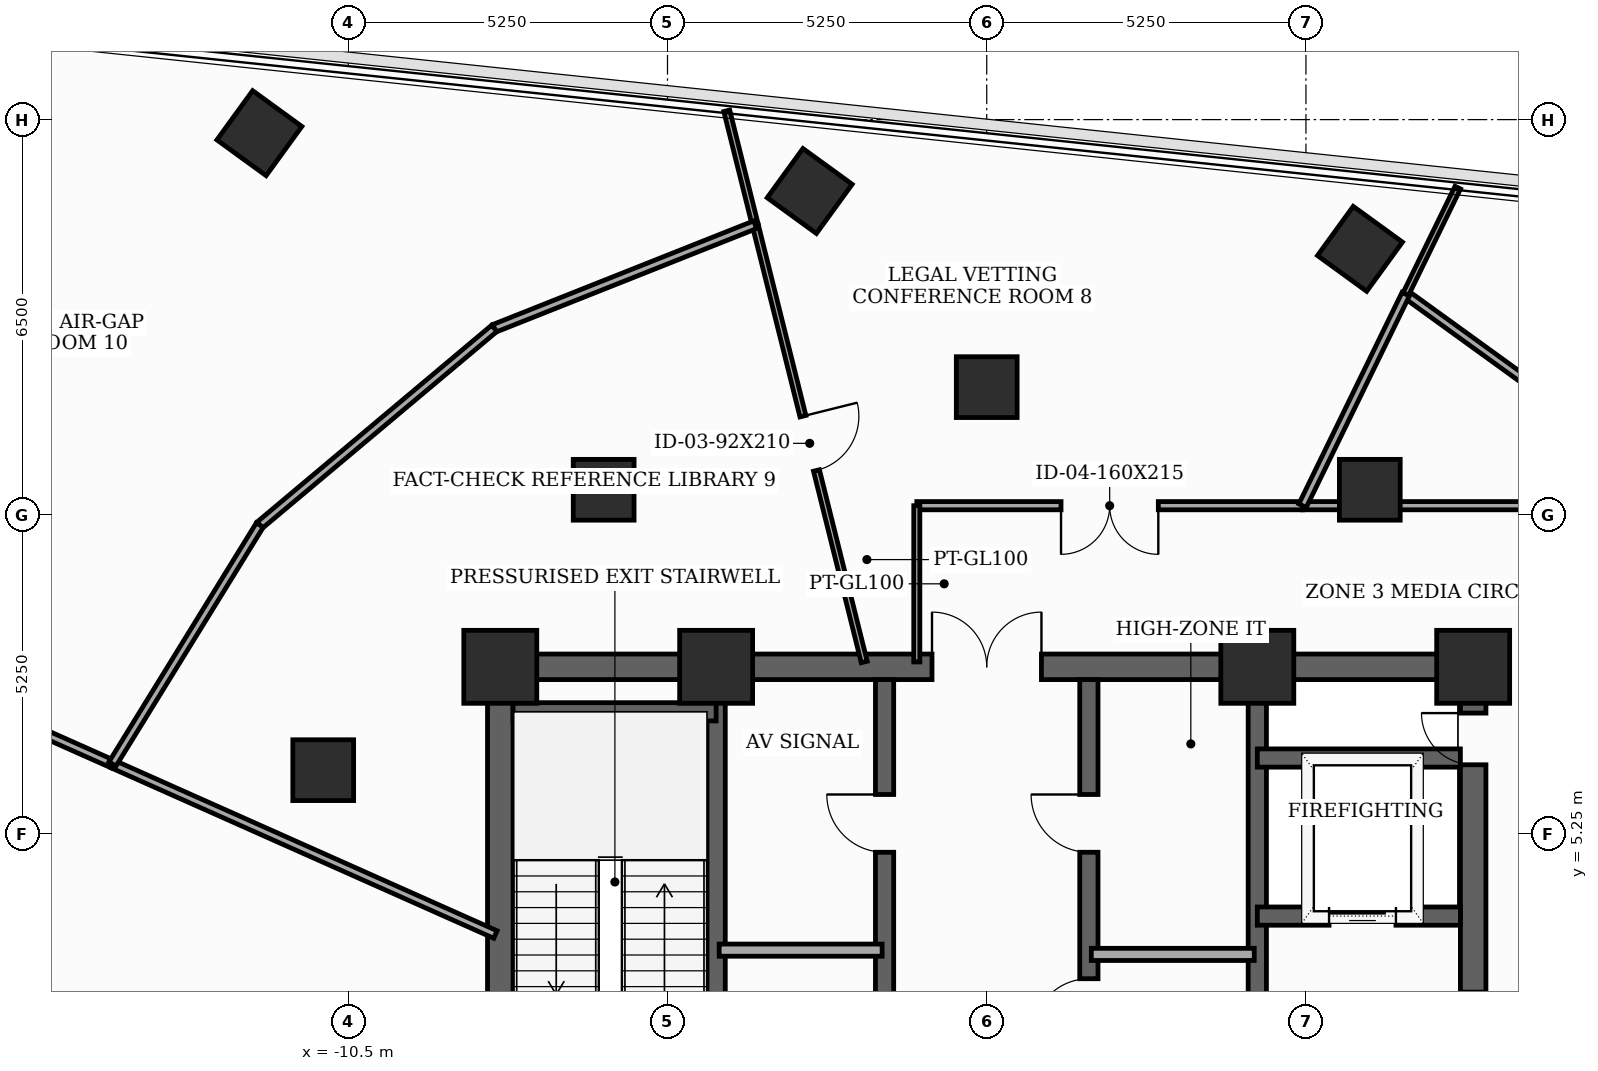
"""IFC4 building model, lengths in metres.
Left out: names, types, materials, properties, quantities, classifications, styles, units other than length and angle.
Written with IfcOpenShell. Run it as: python <this file> out.ifc"""

import sys

from ifc_helpers import new_model, si_unit, direction, frame, frame_2d, origin, origin_2d, place, context, subcontext, project, spatial, rectangle, extrude, element, fill, save


model = new_model("IFC4")
c1 = context("Model", 3, precision=1e-05, world=origin(), true_north=direction((0.0, 1.0)))
c2 = subcontext(c1, "Body", "Model", "MODEL_VIEW")
j1 = project(units=[si_unit("LENGTHUNIT", "METRE"), si_unit("PLANEANGLEUNIT", "RADIAN")], contexts=[c1])
p1 = place(None, origin())
s1 = spatial("IfcSite", under=j1, at=p1, CompositionType="ELEMENT")
p2 = place(p1, origin())
s2 = spatial("IfcBuilding", under=s1, at=p2, CompositionType="ELEMENT")
p3 = place(p2, frame((0.0, 0.0, 233.7)))
s3 = spatial("IfcBuildingStorey", under=s2, at=p3, CompositionType="ELEMENT", Elevation=233.7)
for number, where, z_axis, x_axis in (
    (1, (8.0, 8.0, 0.0), (0.0, 0.0, 1.0), (1.0, 0.0, 0.0)),
    (2, (4.45, 8.0, 0.0), (0.0, 0.0, 1.0), (1.0, 0.0, 0.0)),
    (3, (-4.45, 8.0, 0.0), (0.0, 0.0, 1.0), (1.0, 0.0, 0.0)),
    (4, (-8.0, 8.0, 0.0), (0.0, 0.0, 1.0), (1.0, 0.0, 0.0)),
):
    element("IfcColumn", number, at=place(p3, frame(where, z_axis=z_axis, x_axis=x_axis)), inside=s3, PredefinedType="COLUMN", context=c2, shape_type="SweptSolid", body=[
        extrude(rectangle(XDim=1.2, YDim=1.2, at=origin_2d()), origin(), (0.0, 0.0, 1.0), 3.7),
    ])
for number, where, z_axis, x_axis in (
    (5, (6.3, 10.912, 0.0), (0.0, 0.0, 1.0), (1.0, 0.0, 0.0)),
    (6, (0.0, 12.6, 0.0), (0.0, 0.0, 1.0), (1.0, 0.0, 0.0)),
    (7, (-6.3, 10.912, 0.0), (0.0, 0.0, 1.0), (1.0, 0.0, 0.0)),
    (8, (-10.912, 6.3, 0.0), (0.0, 0.0, 1.0), (1.0, 0.0, 0.0)),
    (9, (6.138, 14.875, 0.0), (0.0, 0.0, 1.0), (0.588, 0.809, 0.0)),
    (10, (-2.912, 15.826, 0.0), (0.0, 0.0, 1.0), (0.588, 0.809, 0.0)),
    (11, (-11.962, 16.777, 0.0), (0.0, 0.0, 1.0), (0.588, 0.809, 0.0)),
):
    element("IfcColumn", number, at=place(p3, frame(where, z_axis=z_axis, x_axis=x_axis)), inside=s3, PredefinedType="COLUMN", context=c2, shape_type="SweptSolid", body=[
        extrude(rectangle(XDim=1.0, YDim=1.0, at=origin_2d()), origin(), (0.0, 0.0, 1.0), 3.7),
    ])
p4 = place(p3, frame((-8.0, -8.0, 0.0), z_axis=(0.0, 0.0, 1.0), x_axis=(0.0, 1.0, 0.0)))
e12 = element("IfcWall", 12, at=p4, inside=s3, PredefinedType="SHEAR", context=c2, shape_type="SweptSolid", body=[
    extrude(rectangle(XDim=16.0, YDim=0.42, at=frame_2d((8.0, 0.0))), origin(), (0.0, 0.0, 1.0), 3.5),
])
p5 = place(p4, frame((0.761, 0.0, 0.0)))
e13 = element("IfcOpeningElement", 13, at=p5, cuts=e12, PredefinedType="OPENING", context=c2, shape_type="SweptSolid", body=[
    extrude(rectangle(XDim=0.85, YDim=2.02, at=frame_2d((0.425, 1.01))), frame((0.0, 0.22, 0.0), z_axis=(0.0, -1.0, 0.0), x_axis=(1.0, 0.0, 0.0)), (0.0, 0.0, 1.0), 0.44),
])
p6 = place(p4, frame((5.35, 0.0, 0.0)))
e14 = element("IfcOpeningElement", 14, at=p6, cuts=e12, PredefinedType="OPENING", context=c2, shape_type="SweptSolid", body=[
    extrude(rectangle(XDim=1.05, YDim=2.15, at=frame_2d((0.525, 1.075))), frame((0.0, 0.22, 0.0), z_axis=(0.0, -1.0, 0.0), x_axis=(1.0, 0.0, 0.0)), (0.0, 0.0, 1.0), 0.44),
])
p7 = place(p3, frame((8.0, -8.0, 0.0), z_axis=(0.0, 0.0, 1.0), x_axis=(0.0, 1.0, 0.0)))
e15 = element("IfcWall", 15, at=p7, inside=s3, PredefinedType="SHEAR", context=c2, shape_type="SweptSolid", body=[
    extrude(rectangle(XDim=16.0, YDim=0.42, at=frame_2d((8.0, 0.0))), origin(), (0.0, 0.0, 1.0), 3.5),
])
p8 = place(p7, frame((9.6, 0.0, 0.0)))
e16 = element("IfcOpeningElement", 16, at=p8, cuts=e15, PredefinedType="OPENING", context=c2, shape_type="SweptSolid", body=[
    extrude(rectangle(XDim=1.05, YDim=2.15, at=frame_2d((0.525, 1.075))), frame((0.0, 0.22, 0.0), z_axis=(0.0, -1.0, 0.0), x_axis=(1.0, 0.0, 0.0)), (0.0, 0.0, 1.0), 0.44),
])
p9 = place(p7, frame((14.389, 0.0, 0.0)))
e17 = element("IfcOpeningElement", 17, at=p9, cuts=e15, PredefinedType="OPENING", context=c2, shape_type="SweptSolid", body=[
    extrude(rectangle(XDim=0.85, YDim=2.02, at=frame_2d((0.425, 1.01))), frame((0.0, 0.22, 0.0), z_axis=(0.0, -1.0, 0.0), x_axis=(1.0, 0.0, 0.0)), (0.0, 0.0, 1.0), 0.44),
])
p10 = place(p3, frame((-8.0, 8.0, 0.0), z_axis=(0.0, 0.0, 1.0), x_axis=(1.0, 0.0, 0.0)))
e18 = element("IfcWall", 18, at=p10, inside=s3, PredefinedType="SHEAR", context=c2, shape_type="SweptSolid", body=[
    extrude(rectangle(XDim=16.0, YDim=0.42, at=frame_2d((8.0, 0.0))), origin(), (0.0, 0.0, 1.0), 3.5),
])
p11 = place(p10, frame((7.1, 0.0, 0.0)))
e19 = element("IfcOpeningElement", 19, at=p11, cuts=e18, PredefinedType="OPENING", context=c2, shape_type="SweptSolid", body=[
    extrude(rectangle(XDim=1.8, YDim=2.15, at=frame_2d((0.9, 1.075))), frame((0.0, 0.22, 0.0), z_axis=(0.0, -1.0, 0.0), x_axis=(1.0, 0.0, 0.0)), (0.0, 0.0, 1.0), 0.44),
])
for number, where, z_axis, x_axis in (
    (20, (-4.45, -7.79, 0.0), (0.0, 0.0, 1.0), (0.0, 1.0, 0.0)),
    (21, (4.45, -7.79, 0.0), (0.0, 0.0, 1.0), (0.0, 1.0, 0.0)),
):
    element("IfcWall", number, at=place(p3, frame(where, z_axis=z_axis, x_axis=x_axis)), inside=s3, PredefinedType="SHEAR", context=c2, shape_type="SweptSolid", body=[
        extrude(rectangle(XDim=15.58, YDim=0.3, at=frame_2d((7.79, 0.0))), origin(), (0.0, 0.0, 1.0), 3.5),
    ])
p12 = place(p3, frame((-7.79, 7.26, 0.0), z_axis=(0.0, 0.0, 1.0), x_axis=(1.0, 0.0, 0.0)))
e22 = element("IfcWall", 22, at=p12, inside=s3, PredefinedType="SHEAR", context=c2, shape_type="SweptSolid", body=[
    extrude(rectangle(XDim=3.34, YDim=0.3, at=frame_2d((1.67, 0.0))), origin(), (0.0, 0.0, 1.0), 3.5),
])
p13 = place(p3, frame((4.45, 3.9, 0.0), z_axis=(0.0, 0.0, 1.0), x_axis=(1.0, 0.0, 0.0)))
e23 = element("IfcWall", 23, at=p13, inside=s3, PredefinedType="SHEAR", context=c2, shape_type="SweptSolid", body=[
    extrude(rectangle(XDim=3.34, YDim=0.3, at=frame_2d((1.67, 0.0))), origin(), (0.0, 0.0, 1.0), 3.5),
])
p14 = place(p13, frame((1.18, 0.0, 0.0)))
e24 = element("IfcOpeningElement", 24, at=p14, cuts=e23, PredefinedType="OPENING", context=c2, shape_type="SweptSolid", body=[
    extrude(rectangle(XDim=1.1, YDim=2.1, at=frame_2d((0.55, 1.05))), frame((0.0, 0.16, 0.0), z_axis=(0.0, -1.0, 0.0), x_axis=(1.0, 0.0, 0.0)), (0.0, 0.0, 1.0), 0.32),
])
p15 = place(p3, frame((4.45, 6.5, 0.0), z_axis=(0.0, 0.0, 1.0), x_axis=(1.0, 0.0, 0.0)))
e25 = element("IfcWall", 25, at=p15, inside=s3, PredefinedType="SHEAR", context=c2, shape_type="SweptSolid", body=[
    extrude(rectangle(XDim=3.34, YDim=0.3, at=frame_2d((1.67, 0.0))), origin(), (0.0, 0.0, 1.0), 3.5),
])
p16 = place(p3, frame((-1.68, -4.85, 0.0), z_axis=(0.0, 0.0, 1.0), x_axis=(0.0, 1.0, 0.0)))
e26 = element("IfcWall", 26, at=p16, inside=s3, PredefinedType="SHEAR", context=c2, shape_type="SweptSolid", body=[
    extrude(rectangle(XDim=12.64, YDim=0.3, at=frame_2d((6.32, 0.0))), origin(), (0.0, 0.0, 1.0), 3.5),
])
p17 = place(p16, frame((3.5, 0.0, 0.0)))
e27 = element("IfcOpeningElement", 27, at=p17, cuts=e26, PredefinedType="OPENING", context=c2, shape_type="SweptSolid", body=[
    extrude(rectangle(XDim=0.95, YDim=2.1, at=frame_2d((0.475, 1.05))), frame((0.0, 0.16, 0.0), z_axis=(0.0, -1.0, 0.0), x_axis=(1.0, 0.0, 0.0)), (0.0, 0.0, 1.0), 0.32),
])
p18 = place(p16, frame((9.8, 0.0, 0.0)))
e28 = element("IfcOpeningElement", 28, at=p18, cuts=e26, PredefinedType="OPENING", context=c2, shape_type="SweptSolid", body=[
    extrude(rectangle(XDim=0.95, YDim=2.1, at=frame_2d((0.475, 1.05))), frame((0.0, 0.16, 0.0), z_axis=(0.0, -1.0, 0.0), x_axis=(1.0, 0.0, 0.0)), (0.0, 0.0, 1.0), 0.32),
])
p19 = place(p3, frame((1.68, -4.85, 0.0), z_axis=(0.0, 0.0, 1.0), x_axis=(0.0, 1.0, 0.0)))
e29 = element("IfcWall", 29, at=p19, inside=s3, PredefinedType="SHEAR", context=c2, shape_type="SweptSolid", body=[
    extrude(rectangle(XDim=12.64, YDim=0.3, at=frame_2d((6.32, 0.0))), origin(), (0.0, 0.0, 1.0), 3.5),
])
p20 = place(p19, frame((0.55, 0.0, 0.0)))
e30 = element("IfcOpeningElement", 30, at=p20, cuts=e29, PredefinedType="OPENING", context=c2, shape_type="SweptSolid", body=[
    extrude(rectangle(XDim=1.1, YDim=2.1, at=frame_2d((0.55, 1.05))), frame((0.0, 0.16, 0.0), z_axis=(0.0, -1.0, 0.0), x_axis=(1.0, 0.0, 0.0)), (0.0, 0.0, 1.0), 0.32),
])
p21 = place(p19, frame((2.65, 0.0, 0.0)))
e31 = element("IfcOpeningElement", 31, at=p21, cuts=e29, PredefinedType="OPENING", context=c2, shape_type="SweptSolid", body=[
    extrude(rectangle(XDim=1.1, YDim=2.1, at=frame_2d((0.55, 1.05))), frame((0.0, 0.16, 0.0), z_axis=(0.0, -1.0, 0.0), x_axis=(1.0, 0.0, 0.0)), (0.0, 0.0, 1.0), 0.32),
])
p22 = place(p19, frame((4.75, 0.0, 0.0)))
e32 = element("IfcOpeningElement", 32, at=p22, cuts=e29, PredefinedType="OPENING", context=c2, shape_type="SweptSolid", body=[
    extrude(rectangle(XDim=1.1, YDim=2.1, at=frame_2d((0.55, 1.05))), frame((0.0, 0.16, 0.0), z_axis=(0.0, -1.0, 0.0), x_axis=(1.0, 0.0, 0.0)), (0.0, 0.0, 1.0), 0.32),
])
p23 = place(p19, frame((6.8, 0.0, 0.0)))
e33 = element("IfcOpeningElement", 33, at=p23, cuts=e29, PredefinedType="OPENING", context=c2, shape_type="SweptSolid", body=[
    extrude(rectangle(XDim=0.92, YDim=2.1, at=frame_2d((0.46, 1.05))), frame((0.0, 0.16, 0.0), z_axis=(0.0, -1.0, 0.0), x_axis=(1.0, 0.0, 0.0)), (0.0, 0.0, 1.0), 0.32),
])
p24 = place(p19, frame((9.8, 0.0, 0.0)))
e34 = element("IfcOpeningElement", 34, at=p24, cuts=e29, PredefinedType="OPENING", context=c2, shape_type="SweptSolid", body=[
    extrude(rectangle(XDim=0.95, YDim=2.1, at=frame_2d((0.475, 1.05))), frame((0.0, 0.16, 0.0), z_axis=(0.0, -1.0, 0.0), x_axis=(1.0, 0.0, 0.0)), (0.0, 0.0, 1.0), 0.32),
])
for number, where, z_axis, x_axis in (
    (35, (-4.4, 3.34, 0.0), (0.0, 0.0, 1.0), (1.0, 0.0, 0.0)),
    (36, (1.72, 3.27, 0.0), (0.0, 0.0, 1.0), (1.0, 0.0, 0.0)),
):
    element("IfcWall", number, at=place(p3, frame(where, z_axis=z_axis, x_axis=x_axis)), inside=s3, PredefinedType="SOLIDWALL", context=c2, shape_type="SweptSolid", body=[
        extrude(rectangle(XDim=2.68, YDim=0.2, at=frame_2d((1.34, 0.0))), origin(), (0.0, 0.0, 1.0), 3.5),
    ])
p25 = place(p3, frame((10.15, 10.65, 0.0), z_axis=(0.0, 0.0, 1.0), x_axis=(-1.0, 0.0, 0.0)))
e37 = element("IfcWall", 37, at=p25, inside=s3, PredefinedType="PARTITIONING", context=c2, shape_type="SweptSolid", body=[
    extrude(rectangle(XDim=4.956, YDim=0.135, at=frame_2d((2.478, 0.0))), origin(), (0.0, 0.0, 1.0), 2.885),
])
p26 = place(p3, frame((5.194, 10.65, 0.0), z_axis=(0.0, 0.0, 1.0), x_axis=(-1.0, 0.0, 0.0)))
e38 = element("IfcWall", 38, at=p26, inside=s3, PredefinedType="PARTITIONING", context=c2, shape_type="SweptSolid", body=[
    extrude(rectangle(XDim=6.344, YDim=0.135, at=frame_2d((3.172, 0.0))), origin(), (0.0, 0.0, 1.0), 2.885),
])
p27 = place(p26, frame((2.372, 0.0, 0.0)))
e39 = element("IfcOpeningElement", 39, at=p27, cuts=e38, PredefinedType="OPENING", context=c2, shape_type="SweptSolid", body=[
    extrude(rectangle(XDim=1.6, YDim=2.15, at=frame_2d((0.8, 1.075))), frame((0.0, 0.077, 0.0), z_axis=(0.0, -1.0, 0.0), x_axis=(1.0, 0.0, 0.0)), (0.0, 0.0, 1.0), 0.155),
])
p28 = place(p3, frame((-1.15, 10.65, 0.0), z_axis=(0.0, 0.0, 1.0), x_axis=(0.0, -1.0, 0.0)))
e40 = element("IfcWall", 40, at=p28, inside=s3, PredefinedType="MOVABLE", context=c2, shape_type="SweptSolid", body=[
    extrude(rectangle(XDim=2.57, YDim=0.1, at=frame_2d((1.285, 0.0))), origin(), (0.0, 0.0, 1.0), 2.885),
])
p29 = place(p3, frame((-8.08, 3.597, 0.0), z_axis=(0.0, 0.0, 1.0), x_axis=(-0.913494385598, 0.40685133339, 0.0)))
e41 = element("IfcWall", 41, at=p29, inside=s3, PredefinedType="PARTITIONING", context=c2, shape_type="SweptSolid", body=[
    extrude(rectangle(XDim=6.894, YDim=0.135, at=frame_2d((3.447, 0.0))), origin(), (0.0, 0.0, 1.0), 2.885),
])
p30 = place(p3, frame((-14.378, 6.402, 0.0), z_axis=(0.0, 0.0, 1.0), x_axis=(-0.913562917951, 0.406697424315, 0.0)))
e42 = element("IfcWall", 42, at=p30, inside=s3, PredefinedType="PARTITIONING", context=c2, shape_type="SweptSolid", body=[
    extrude(rectangle(XDim=9.077, YDim=0.135, at=frame_2d((4.538, 0.0))), origin(), (0.0, 0.0, 1.0), 2.985),
])
p31 = place(p30, frame((4.078, 0.0, 0.0)))
e43 = element("IfcOpeningElement", 43, at=p31, cuts=e42, PredefinedType="OPENING", context=c2, shape_type="SweptSolid", body=[
    extrude(rectangle(XDim=0.92, YDim=2.1, at=frame_2d((0.46, 1.05))), frame((0.0, 0.077, 0.0), z_axis=(0.0, -1.0, 0.0), x_axis=(1.0, 0.0, 0.0)), (0.0, 0.0, 1.0), 0.155),
])
p32 = place(p3, frame((11.602, 10.725, 0.0), z_axis=(0.0, 0.0, 1.0), x_axis=(-0.810322435649, 0.58598425771, 0.0)))
e44 = element("IfcWall", 44, at=p32, inside=s3, PredefinedType="PARTITIONING", context=c2, shape_type="SweptSolid", body=[
    extrude(rectangle(XDim=5.812, YDim=0.135, at=frame_2d((2.906, 0.0))), origin(), (0.0, 0.0, 1.0), 3.5),
])
p33 = place(p3, frame((6.892, 14.131, 0.0), z_axis=(0.0, 0.0, 1.0), x_axis=(-0.438392584888, -0.898783589923, 0.0)))
e45 = element("IfcWall", 45, at=p33, inside=s3, PredefinedType="PARTITIONING", context=c2, shape_type="SweptSolid", body=[
    extrude(rectangle(XDim=3.873, YDim=0.135, at=frame_2d((1.937, 0.0))), origin(), (0.0, 0.0, 1.0), 2.885),
])
p34 = place(p3, frame((7.747, 15.882, 0.0), z_axis=(0.0, 0.0, 1.0), x_axis=(-0.438571753549, -0.898696176129, 0.0)))
e46 = element("IfcWall", 46, at=p34, inside=s3, PredefinedType="MOVABLE", context=c2, shape_type="SweptSolid", body=[
    extrude(rectangle(XDim=1.948, YDim=0.1, at=frame_2d((0.974, 0.0))), origin(), (0.0, 0.0, 1.0), 3.035),
])
p35 = place(p3, frame((-3.808, 15.271, 0.0), z_axis=(0.0, 0.0, 1.0), x_axis=(0.241993010569, -0.970277992555, 0.0)))
e47 = element("IfcWall", 47, at=p35, inside=s3, PredefinedType="MOVABLE", context=c2, shape_type="SweptSolid", body=[
    extrude(rectangle(XDim=7.411, YDim=0.1, at=frame_2d((3.706, 0.0))), origin(), (0.0, 0.0, 1.0), 2.885),
])
p36 = place(p35, frame((3.246, 0.0, 0.0)))
e48 = element("IfcOpeningElement", 48, at=p36, cuts=e47, PredefinedType="OPENING", context=c2, shape_type="SweptSolid", body=[
    extrude(rectangle(XDim=0.92, YDim=2.1, at=frame_2d((0.46, 1.05))), frame((0.0, 0.06, 0.0), z_axis=(0.0, -1.0, 0.0), x_axis=(1.0, 0.0, 0.0)), (0.0, 0.0, 1.0), 0.12),
])
p37 = place(p3, frame((-4.275, 17.146, 0.0), z_axis=(0.0, 0.0, 1.0), x_axis=(0.241881394388, -0.970305823464, 0.0)))
e49 = element("IfcWall", 49, at=p37, inside=s3, PredefinedType="MOVABLE", context=c2, shape_type="SweptSolid", body=[
    extrude(rectangle(XDim=1.932, YDim=0.1, at=frame_2d((0.966, 0.0))), origin(), (0.0, 0.0, 1.0), 3.035),
])
p38 = place(p3, frame((-3.808, 15.271, 0.0), z_axis=(0.0, 0.0, 1.0), x_axis=(-0.929356809345, -0.369182774414, 0.0)))
e50 = element("IfcWall", 50, at=p38, inside=s3, PredefinedType="PARTITIONING", context=c2, shape_type="SweptSolid", body=[
    extrude(rectangle(XDim=4.616, YDim=0.135, at=frame_2d((2.308, 0.0))), origin(), (0.0, 0.0, 1.0), 3.5),
])
p39 = place(p3, frame((-8.098, 13.567, 0.0), z_axis=(0.0, 0.0, 1.0), x_axis=(-0.766114520239, -0.642704085781, 0.0)))
e51 = element("IfcWall", 51, at=p39, inside=s3, PredefinedType="PARTITIONING", context=c2, shape_type="SweptSolid", body=[
    extrude(rectangle(XDim=5.035, YDim=0.135, at=frame_2d((2.517, 0.0))), origin(), (0.0, 0.0, 1.0), 2.985),
])
p40 = place(p3, frame((-11.955, 10.331, 0.0), z_axis=(0.0, 0.0, 1.0), x_axis=(-0.524888064347, -0.851171263557, 0.0)))
e52 = element("IfcWall", 52, at=p40, inside=s3, PredefinedType="PARTITIONING", context=c2, shape_type="SweptSolid", body=[
    extrude(rectangle(XDim=4.616, YDim=0.135, at=frame_2d((2.308, 0.0))), origin(), (0.0, 0.0, 1.0), 2.985),
])
p41 = place(p9, origin())
e53 = element("IfcDoor", 53, at=p41, inside=s3, OperationType="SINGLE_SWING_RIGHT", PredefinedType="TRAPDOOR", context=c2, shape_type="SweptSolid", body=[
    extrude(rectangle(XDim=0.85, YDim=2.02, at=frame_2d((0.425, 1.01))), frame((0.0, 0.025, 0.0), z_axis=(0.0, -1.0, 0.0), x_axis=(1.0, 0.0, 0.0)), (0.0, 0.0, 1.0), 0.05),
])
fill(e17, e53)
p42 = place(p11, origin())
e54 = element("IfcDoor", 54, at=p42, inside=s3, OperationType="DOUBLE_DOOR_SINGLE_SWING", PredefinedType="DOOR", context=c2, shape_type="SweptSolid", body=[
    extrude(rectangle(XDim=1.8, YDim=2.15, at=frame_2d((0.9, 1.075))), frame((0.0, 0.025, 0.0), z_axis=(0.0, -1.0, 0.0), x_axis=(1.0, 0.0, 0.0)), (0.0, 0.0, 1.0), 0.05),
])
fill(e19, e54)
p43 = place(p14, origin())
e55 = element("IfcDoor", 55, at=p43, inside=s3, OperationType="SLIDING_TO_LEFT", PredefinedType="DOOR", context=c2, shape_type="SweptSolid", body=[
    extrude(rectangle(XDim=1.1, YDim=2.1, at=frame_2d((0.55, 1.05))), frame((0.0, 0.025, 0.0), z_axis=(0.0, -1.0, 0.0), x_axis=(1.0, 0.0, 0.0)), (0.0, 0.0, 1.0), 0.05),
])
fill(e24, e55)
p44 = place(p18, origin())
e56 = element("IfcDoor", 56, at=p44, inside=s3, OperationType="SINGLE_SWING_RIGHT", PredefinedType="DOOR", context=c2, shape_type="SweptSolid", body=[
    extrude(rectangle(XDim=0.95, YDim=2.1, at=frame_2d((0.475, 1.05))), frame((0.0, 0.025, 0.0), z_axis=(0.0, -1.0, 0.0), x_axis=(1.0, 0.0, 0.0)), (0.0, 0.0, 1.0), 0.05),
])
fill(e28, e56)
p45 = place(p23, origin())
e57 = element("IfcDoor", 57, at=p45, inside=s3, OperationType="SINGLE_SWING_LEFT", PredefinedType="DOOR", context=c2, shape_type="SweptSolid", body=[
    extrude(rectangle(XDim=0.92, YDim=2.1, at=frame_2d((0.46, 1.05))), frame((0.0, 0.025, 0.0), z_axis=(0.0, -1.0, 0.0), x_axis=(1.0, 0.0, 0.0)), (0.0, 0.0, 1.0), 0.05),
])
fill(e33, e57)
p46 = place(p24, origin())
e58 = element("IfcDoor", 58, at=p46, inside=s3, OperationType="SINGLE_SWING_RIGHT", PredefinedType="DOOR", context=c2, shape_type="SweptSolid", body=[
    extrude(rectangle(XDim=0.95, YDim=2.1, at=frame_2d((0.475, 1.05))), frame((0.0, 0.025, 0.0), z_axis=(0.0, -1.0, 0.0), x_axis=(1.0, 0.0, 0.0)), (0.0, 0.0, 1.0), 0.05),
])
fill(e34, e58)
p47 = place(p27, origin())
e59 = element("IfcDoor", 59, at=p47, inside=s3, OperationType="DOUBLE_DOOR_SINGLE_SWING", PredefinedType="DOOR", context=c2, shape_type="SweptSolid", body=[
    extrude(rectangle(XDim=1.6, YDim=2.15, at=frame_2d((0.8, 1.075))), frame((0.0, 0.025, 0.0), z_axis=(0.0, -1.0, 0.0), x_axis=(1.0, 0.0, 0.0)), (0.0, 0.0, 1.0), 0.05),
])
fill(e39, e59)
p48 = place(p36, origin())
e60 = element("IfcDoor", 60, at=p48, inside=s3, OperationType="SINGLE_SWING_LEFT", PredefinedType="DOOR", context=c2, shape_type="SweptSolid", body=[
    extrude(rectangle(XDim=0.92, YDim=2.1, at=frame_2d((0.46, 1.05))), frame((0.0, 0.025, 0.0), z_axis=(0.0, -1.0, 0.0), x_axis=(1.0, 0.0, 0.0)), (0.0, 0.0, 1.0), 0.05),
])
fill(e48, e60)
save(model, sys.argv[1])
